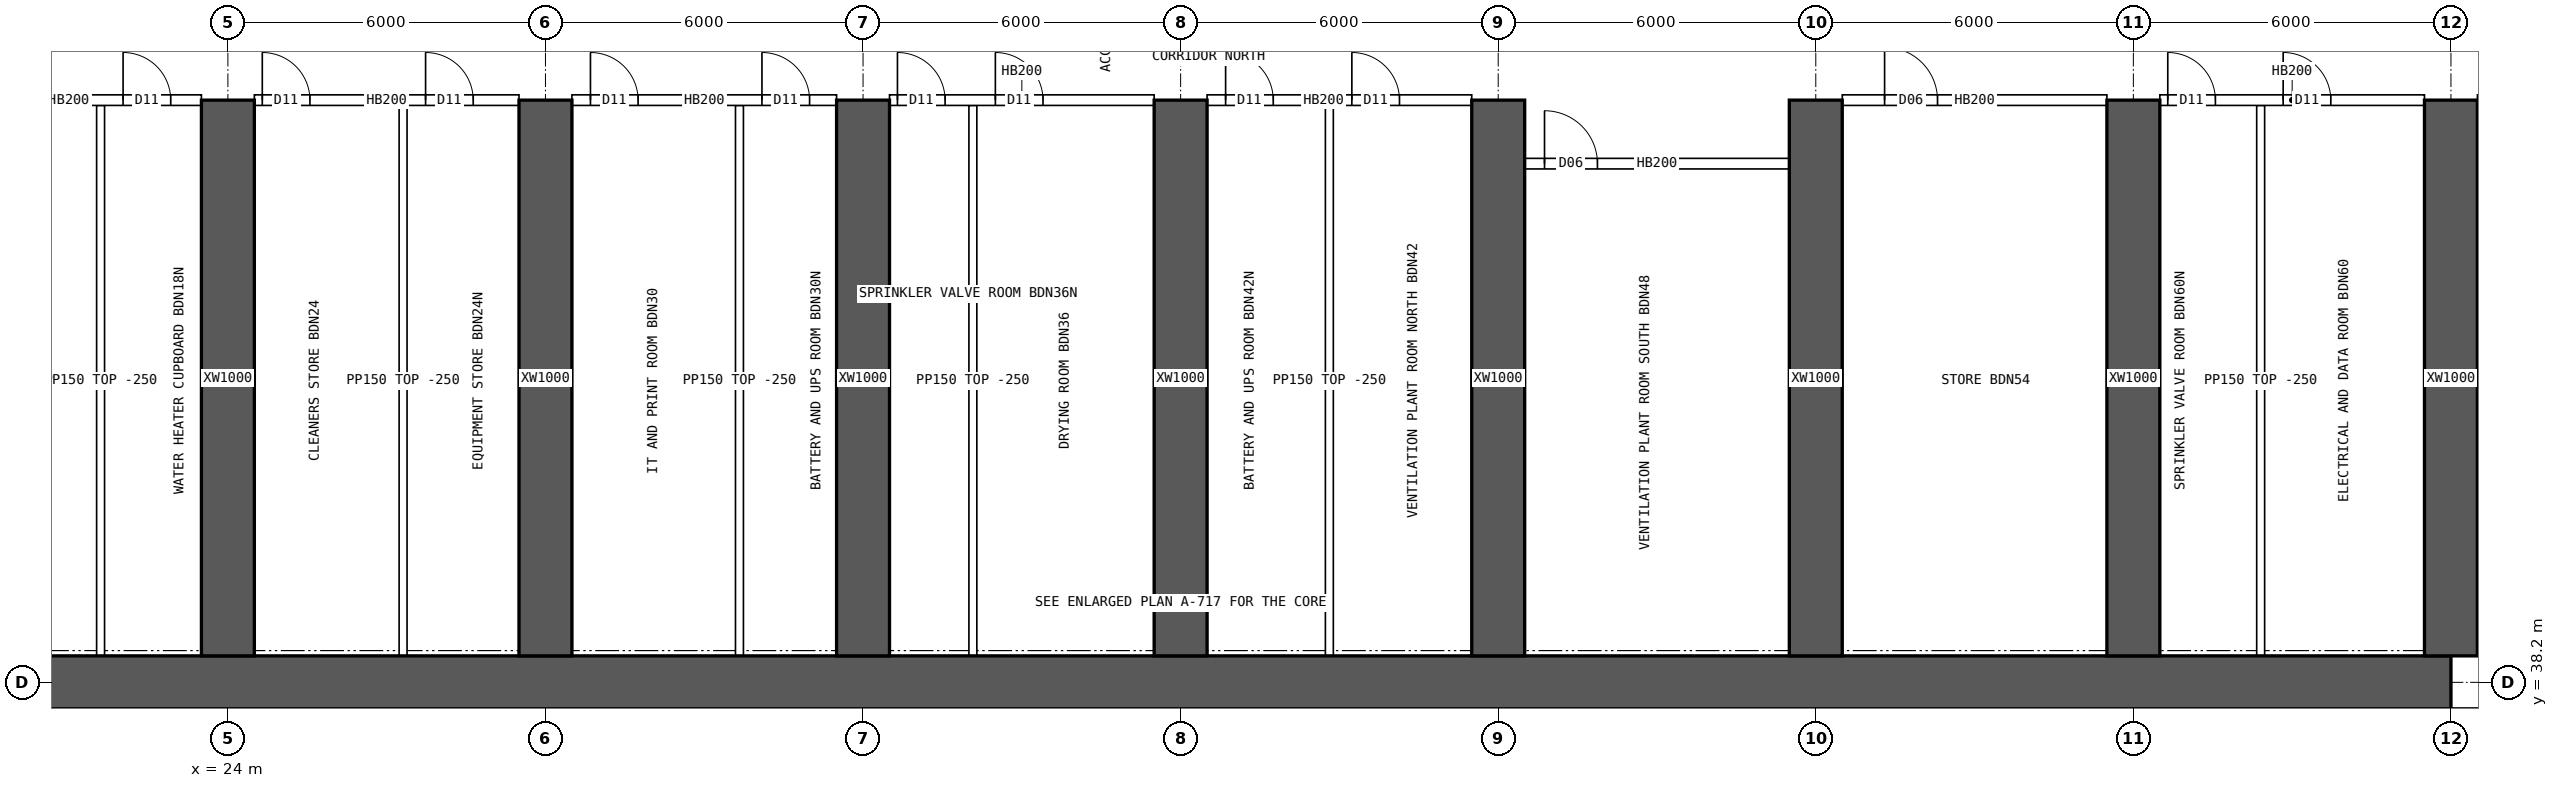
"""IFC4 building model, lengths in metres.
Left out: names, types, materials, properties, quantities, classifications, styles, units other than length and angle.
Written with IfcOpenShell. Run it as: python <this file> out.ifc"""

import sys

from ifc_helpers import new_model, si_unit, direction, frame, frame_2d, origin, place, context, subcontext, project, spatial, rectangle, extrude, element, fill, save


model = new_model("IFC4")
c1 = context("Model", 3, precision=1e-05, world=origin(), true_north=direction((0.0, 1.0)))
c2 = subcontext(c1, "Body", "Model", "MODEL_VIEW")
j1 = project(units=[si_unit("LENGTHUNIT", "METRE"), si_unit("PLANEANGLEUNIT", "RADIAN")], contexts=[c1])
p1 = place(None, origin())
s1 = spatial("IfcSite", under=j1, at=p1, CompositionType="ELEMENT")
p2 = place(p1, origin())
s2 = spatial("IfcBuilding", under=s1, at=p2, CompositionType="ELEMENT")
p3 = place(p2, frame((0.0, 0.0, 57.7)))
s3 = spatial("IfcBuildingStorey", under=s2, at=p3, CompositionType="ELEMENT", Elevation=57.7)
p4 = place(p3, frame((18.0, 38.2, 0.0), z_axis=(0.0, 0.0, 1.0), x_axis=(1.0, 0.0, 0.0)))
e1 = element("IfcWall", 1, at=p4, inside=s3, PredefinedType="SHEAR", context=c2, shape_type="SweptSolid", body=[
    extrude(rectangle(XDim=48.0, YDim=1.0, at=frame_2d((24.0, 0.0))), origin(), (0.0, 0.0, 1.0), 3.75),
])
for number, where, z_axis, x_axis in (
    (2, (21.6, 34.75, 0.0), (0.0, 0.0, 1.0), (0.0, 1.0, 0.0)),
    (3, (62.4, 34.75, 0.0), (0.0, 0.0, 1.0), (0.0, 1.0, 0.0)),
    (4, (26.0, 34.75, 0.0), (0.0, 0.0, 1.0), (0.0, 1.0, 0.0)),
    (5, (58.0, 34.75, 0.0), (0.0, 0.0, 1.0), (0.0, 1.0, 0.0)),
):
    element("IfcWall", number, at=place(p3, frame(where, z_axis=z_axis, x_axis=x_axis)), inside=s3, PredefinedType="SHEAR", context=c2, shape_type="SweptSolid", body=[
        extrude(rectangle(XDim=2.95, YDim=0.3, at=frame_2d((1.475, 0.0))), origin(), (0.0, 0.0, 1.0), 3.75),
    ])
for number, where, z_axis, x_axis in (
    (6, (24.0, 38.7, 0.0), (0.0, 0.0, 1.0), (0.0, 1.0, 0.0)),
    (7, (30.0, 38.7, 0.0), (0.0, 0.0, 1.0), (0.0, 1.0, 0.0)),
    (8, (36.0, 38.7, 0.0), (0.0, 0.0, 1.0), (0.0, 1.0, 0.0)),
    (9, (42.0, 38.7, 0.0), (0.0, 0.0, 1.0), (0.0, 1.0, 0.0)),
    (10, (48.0, 38.7, 0.0), (0.0, 0.0, 1.0), (0.0, 1.0, 0.0)),
    (11, (54.0, 38.7, 0.0), (0.0, 0.0, 1.0), (0.0, 1.0, 0.0)),
    (12, (60.0, 38.7, 0.0), (0.0, 0.0, 1.0), (0.0, 1.0, 0.0)),
    (13, (66.0, 38.7, 0.0), (0.0, 0.0, 1.0), (0.0, 1.0, 0.0)),
):
    element("IfcWall", number, at=place(p3, frame(where, z_axis=z_axis, x_axis=x_axis)), inside=s3, PredefinedType="SHEAR", context=c2, shape_type="SweptSolid", body=[
        extrude(rectangle(XDim=10.5, YDim=1.0, at=frame_2d((5.25, 0.0))), origin(), (0.0, 0.0, 1.0), 3.75),
    ])
for number, where, z_axis, x_axis in (
    (14, (29.651, 34.75, 0.0), (0.0, 0.0, 1.0), (0.0, 1.0, 0.0)),
    (15, (33.946, 34.75, 0.0), (0.0, 0.0, 1.0), (0.0, 1.0, 0.0)),
    (16, (36.946, 34.75, 0.0), (0.0, 0.0, 1.0), (0.0, 1.0, 0.0)),
    (17, (41.463, 34.75, 0.0), (0.0, 0.0, 1.0), (0.0, 1.0, 0.0)),
    (18, (45.758, 34.75, 0.0), (0.0, 0.0, 1.0), (0.0, 1.0, 0.0)),
    (19, (47.058, 34.75, 0.0), (0.0, 0.0, 1.0), (0.0, 1.0, 0.0)),
    (20, (50.503, 34.75, 0.0), (0.0, 0.0, 1.0), (0.0, 1.0, 0.0)),
):
    element("IfcWall", number, at=place(p3, frame(where, z_axis=z_axis, x_axis=x_axis)), inside=s3, PredefinedType="SOLIDWALL", context=c2, shape_type="SweptSolid", body=[
        extrude(rectangle(XDim=2.95, YDim=0.15, at=frame_2d((1.475, 0.0))), origin(), (0.0, 0.0, 1.0), 3.5),
    ])
p5 = place(p3, frame((18.5, 49.2, 0.0), z_axis=(0.0, 0.0, 1.0), x_axis=(1.0, 0.0, 0.0)))
e21 = element("IfcWall", 21, at=p5, inside=s3, PredefinedType="SOLIDWALL", context=c2, shape_type="SweptSolid", body=[
    extrude(rectangle(XDim=5.0, YDim=0.2, at=frame_2d((2.5, 0.0))), origin(), (0.0, 0.0, 1.0), 3.5),
])
p6 = place(p5, frame((0.35, 0.0, 0.0)))
e22 = element("IfcOpeningElement", 22, at=p6, cuts=e21, PredefinedType="OPENING", context=c2, shape_type="SweptSolid", body=[
    extrude(rectangle(XDim=0.9, YDim=2.1, at=frame_2d((0.45, 1.05))), frame((0.0, 0.11, 0.0), z_axis=(0.0, -1.0, 0.0), x_axis=(1.0, 0.0, 0.0)), (0.0, 0.0, 1.0), 0.22),
])
p7 = place(p5, frame((3.52, 0.0, 0.0)))
e23 = element("IfcOpeningElement", 23, at=p7, cuts=e21, PredefinedType="OPENING", context=c2, shape_type="SweptSolid", body=[
    extrude(rectangle(XDim=0.9, YDim=2.1, at=frame_2d((0.45, 1.05))), frame((0.0, 0.11, 0.0), z_axis=(0.0, -1.0, 0.0), x_axis=(1.0, 0.0, 0.0)), (0.0, 0.0, 1.0), 0.22),
])
p8 = place(p3, frame((24.5, 49.2, 0.0), z_axis=(0.0, 0.0, 1.0), x_axis=(1.0, 0.0, 0.0)))
e24 = element("IfcWall", 24, at=p8, inside=s3, PredefinedType="SOLIDWALL", context=c2, shape_type="SweptSolid", body=[
    extrude(rectangle(XDim=5.0, YDim=0.2, at=frame_2d((2.5, 0.0))), origin(), (0.0, 0.0, 1.0), 3.5),
])
p9 = place(p8, frame((0.15, 0.0, 0.0)))
e25 = element("IfcOpeningElement", 25, at=p9, cuts=e24, PredefinedType="OPENING", context=c2, shape_type="SweptSolid", body=[
    extrude(rectangle(XDim=0.9, YDim=2.1, at=frame_2d((0.45, 1.05))), frame((0.0, 0.11, 0.0), z_axis=(0.0, -1.0, 0.0), x_axis=(1.0, 0.0, 0.0)), (0.0, 0.0, 1.0), 0.22),
])
p10 = place(p8, frame((3.235, 0.0, 0.0)))
e26 = element("IfcOpeningElement", 26, at=p10, cuts=e24, PredefinedType="OPENING", context=c2, shape_type="SweptSolid", body=[
    extrude(rectangle(XDim=0.9, YDim=2.1, at=frame_2d((0.45, 1.05))), frame((0.0, 0.11, 0.0), z_axis=(0.0, -1.0, 0.0), x_axis=(1.0, 0.0, 0.0)), (0.0, 0.0, 1.0), 0.22),
])
p11 = place(p3, frame((30.5, 49.2, 0.0), z_axis=(0.0, 0.0, 1.0), x_axis=(1.0, 0.0, 0.0)))
e27 = element("IfcWall", 27, at=p11, inside=s3, PredefinedType="SOLIDWALL", context=c2, shape_type="SweptSolid", body=[
    extrude(rectangle(XDim=5.0, YDim=0.2, at=frame_2d((2.5, 0.0))), origin(), (0.0, 0.0, 1.0), 3.5),
])
p12 = place(p11, frame((0.35, 0.0, 0.0)))
e28 = element("IfcOpeningElement", 28, at=p12, cuts=e27, PredefinedType="OPENING", context=c2, shape_type="SweptSolid", body=[
    extrude(rectangle(XDim=0.9, YDim=2.1, at=frame_2d((0.45, 1.05))), frame((0.0, 0.11, 0.0), z_axis=(0.0, -1.0, 0.0), x_axis=(1.0, 0.0, 0.0)), (0.0, 0.0, 1.0), 0.22),
])
p13 = place(p11, frame((3.59, 0.0, 0.0)))
e29 = element("IfcOpeningElement", 29, at=p13, cuts=e27, PredefinedType="OPENING", context=c2, shape_type="SweptSolid", body=[
    extrude(rectangle(XDim=0.9, YDim=2.1, at=frame_2d((0.45, 1.05))), frame((0.0, 0.11, 0.0), z_axis=(0.0, -1.0, 0.0), x_axis=(1.0, 0.0, 0.0)), (0.0, 0.0, 1.0), 0.22),
])
p14 = place(p3, frame((36.5, 49.2, 0.0), z_axis=(0.0, 0.0, 1.0), x_axis=(1.0, 0.0, 0.0)))
e30 = element("IfcWall", 30, at=p14, inside=s3, PredefinedType="SOLIDWALL", context=c2, shape_type="SweptSolid", body=[
    extrude(rectangle(XDim=5.0, YDim=0.2, at=frame_2d((2.5, 0.0))), origin(), (0.0, 0.0, 1.0), 3.5),
])
p15 = place(p14, frame((0.15, 0.0, 0.0)))
e31 = element("IfcOpeningElement", 31, at=p15, cuts=e30, PredefinedType="OPENING", context=c2, shape_type="SweptSolid", body=[
    extrude(rectangle(XDim=0.9, YDim=2.1, at=frame_2d((0.45, 1.05))), frame((0.0, 0.11, 0.0), z_axis=(0.0, -1.0, 0.0), x_axis=(1.0, 0.0, 0.0)), (0.0, 0.0, 1.0), 0.22),
])
p16 = place(p14, frame((2.0, 0.0, 0.0)))
e32 = element("IfcOpeningElement", 32, at=p16, cuts=e30, PredefinedType="OPENING", context=c2, shape_type="SweptSolid", body=[
    extrude(rectangle(XDim=0.9, YDim=2.1, at=frame_2d((0.45, 1.05))), frame((0.0, 0.11, 0.0), z_axis=(0.0, -1.0, 0.0), x_axis=(1.0, 0.0, 0.0)), (0.0, 0.0, 1.0), 0.22),
])
p17 = place(p3, frame((42.5, 49.2, 0.0), z_axis=(0.0, 0.0, 1.0), x_axis=(1.0, 0.0, 0.0)))
e33 = element("IfcWall", 33, at=p17, inside=s3, PredefinedType="SOLIDWALL", context=c2, shape_type="SweptSolid", body=[
    extrude(rectangle(XDim=5.0, YDim=0.2, at=frame_2d((2.5, 0.0))), origin(), (0.0, 0.0, 1.0), 3.5),
])
p18 = place(p17, frame((0.35, 0.0, 0.0)))
e34 = element("IfcOpeningElement", 34, at=p18, cuts=e33, PredefinedType="OPENING", context=c2, shape_type="SweptSolid", body=[
    extrude(rectangle(XDim=0.9, YDim=2.1, at=frame_2d((0.45, 1.05))), frame((0.0, 0.11, 0.0), z_axis=(0.0, -1.0, 0.0), x_axis=(1.0, 0.0, 0.0)), (0.0, 0.0, 1.0), 0.22),
])
p19 = place(p17, frame((2.735, 0.0, 0.0)))
e35 = element("IfcOpeningElement", 35, at=p19, cuts=e33, PredefinedType="OPENING", context=c2, shape_type="SweptSolid", body=[
    extrude(rectangle(XDim=0.9, YDim=2.1, at=frame_2d((0.45, 1.05))), frame((0.0, 0.11, 0.0), z_axis=(0.0, -1.0, 0.0), x_axis=(1.0, 0.0, 0.0)), (0.0, 0.0, 1.0), 0.22),
])
p20 = place(p3, frame((54.5, 49.2, 0.0), z_axis=(0.0, 0.0, 1.0), x_axis=(1.0, 0.0, 0.0)))
e36 = element("IfcWall", 36, at=p20, inside=s3, PredefinedType="SOLIDWALL", context=c2, shape_type="SweptSolid", body=[
    extrude(rectangle(XDim=5.0, YDim=0.2, at=frame_2d((2.5, 0.0))), origin(), (0.0, 0.0, 1.0), 3.5),
])
p21 = place(p20, frame((0.8, 0.0, 0.0)))
e37 = element("IfcOpeningElement", 37, at=p21, cuts=e36, PredefinedType="OPENING", context=c2, shape_type="SweptSolid", body=[
    extrude(rectangle(XDim=1.0, YDim=2.1, at=frame_2d((0.5, 1.05))), frame((0.0, 0.11, 0.0), z_axis=(0.0, -1.0, 0.0), x_axis=(1.0, 0.0, 0.0)), (0.0, 0.0, 1.0), 0.22),
])
p22 = place(p3, frame((60.5, 49.2, 0.0), z_axis=(0.0, 0.0, 1.0), x_axis=(1.0, 0.0, 0.0)))
e38 = element("IfcWall", 38, at=p22, inside=s3, PredefinedType="SOLIDWALL", context=c2, shape_type="SweptSolid", body=[
    extrude(rectangle(XDim=5.0, YDim=0.2, at=frame_2d((2.5, 0.0))), origin(), (0.0, 0.0, 1.0), 3.5),
])
p23 = place(p22, frame((0.15, 0.0, 0.0)))
e39 = element("IfcOpeningElement", 39, at=p23, cuts=e38, PredefinedType="OPENING", context=c2, shape_type="SweptSolid", body=[
    extrude(rectangle(XDim=0.9, YDim=2.1, at=frame_2d((0.45, 1.05))), frame((0.0, 0.11, 0.0), z_axis=(0.0, -1.0, 0.0), x_axis=(1.0, 0.0, 0.0)), (0.0, 0.0, 1.0), 0.22),
])
p24 = place(p22, frame((2.33, 0.0, 0.0)))
e40 = element("IfcOpeningElement", 40, at=p24, cuts=e38, PredefinedType="OPENING", context=c2, shape_type="SweptSolid", body=[
    extrude(rectangle(XDim=0.9, YDim=2.1, at=frame_2d((0.45, 1.05))), frame((0.0, 0.11, 0.0), z_axis=(0.0, -1.0, 0.0), x_axis=(1.0, 0.0, 0.0)), (0.0, 0.0, 1.0), 0.22),
])
for number, where, z_axis, x_axis in (
    (41, (21.595, 38.7, 0.0), (0.0, 0.0, 1.0), (0.0, 1.0, 0.0)),
    (42, (27.31, 38.7, 0.0), (0.0, 0.0, 1.0), (0.0, 1.0, 0.0)),
    (43, (33.665, 38.7, 0.0), (0.0, 0.0, 1.0), (0.0, 1.0, 0.0)),
    (44, (38.075, 38.7, 0.0), (0.0, 0.0, 1.0), (0.0, 1.0, 0.0)),
    (45, (44.81, 38.7, 0.0), (0.0, 0.0, 1.0), (0.0, 1.0, 0.0)),
):
    element("IfcWall", number, at=place(p3, frame(where, z_axis=z_axis, x_axis=x_axis)), inside=s3, PredefinedType="PARTITIONING", context=c2, shape_type="SweptSolid", body=[
        extrude(rectangle(XDim=10.4, YDim=0.15, at=frame_2d((5.2, 0.0))), origin(), (0.0, 0.0, 1.0), 3.5),
    ])
p25 = place(p3, frame((48.5, 48.0, 0.0), z_axis=(0.0, 0.0, 1.0), x_axis=(1.0, 0.0, 0.0)))
e46 = element("IfcWall", 46, at=p25, inside=s3, PredefinedType="SOLIDWALL", context=c2, shape_type="SweptSolid", body=[
    extrude(rectangle(XDim=5.0, YDim=0.2, at=frame_2d((2.5, 0.0))), origin(), (0.0, 0.0, 1.0), 3.5),
])
p26 = place(p25, frame((0.375, 0.0, 0.0)))
e47 = element("IfcOpeningElement", 47, at=p26, cuts=e46, PredefinedType="OPENING", context=c2, shape_type="SweptSolid", body=[
    extrude(rectangle(XDim=1.0, YDim=2.1, at=frame_2d((0.5, 1.05))), frame((0.0, 0.11, 0.0), z_axis=(0.0, -1.0, 0.0), x_axis=(1.0, 0.0, 0.0)), (0.0, 0.0, 1.0), 0.22),
])
p27 = place(p3, frame((62.405, 38.7, 0.0), z_axis=(0.0, 0.0, 1.0), x_axis=(0.0, 1.0, 0.0)))
e48 = element("IfcWall", 48, at=p27, inside=s3, PredefinedType="PARTITIONING", context=c2, shape_type="SweptSolid", body=[
    extrude(rectangle(XDim=10.4, YDim=0.15, at=frame_2d((5.2, 0.0))), origin(), (0.0, 0.0, 1.0), 3.5),
])
p28 = place(p7, origin())
e49 = element("IfcDoor", 49, at=p28, inside=s3, OperationType="SINGLE_SWING_LEFT", PredefinedType="DOOR", context=c2, shape_type="SweptSolid", body=[
    extrude(rectangle(XDim=0.9, YDim=2.1, at=frame_2d((0.45, 1.05))), frame((0.0, 0.025, 0.0), z_axis=(0.0, -1.0, 0.0), x_axis=(1.0, 0.0, 0.0)), (0.0, 0.0, 1.0), 0.05),
])
fill(e23, e49)
p29 = place(p9, origin())
e50 = element("IfcDoor", 50, at=p29, inside=s3, OperationType="SINGLE_SWING_LEFT", PredefinedType="DOOR", context=c2, shape_type="SweptSolid", body=[
    extrude(rectangle(XDim=0.9, YDim=2.1, at=frame_2d((0.45, 1.05))), frame((0.0, 0.025, 0.0), z_axis=(0.0, -1.0, 0.0), x_axis=(1.0, 0.0, 0.0)), (0.0, 0.0, 1.0), 0.05),
])
fill(e25, e50)
p30 = place(p10, origin())
e51 = element("IfcDoor", 51, at=p30, inside=s3, OperationType="SINGLE_SWING_LEFT", PredefinedType="DOOR", context=c2, shape_type="SweptSolid", body=[
    extrude(rectangle(XDim=0.9, YDim=2.1, at=frame_2d((0.45, 1.05))), frame((0.0, 0.025, 0.0), z_axis=(0.0, -1.0, 0.0), x_axis=(1.0, 0.0, 0.0)), (0.0, 0.0, 1.0), 0.05),
])
fill(e26, e51)
p31 = place(p12, origin())
e52 = element("IfcDoor", 52, at=p31, inside=s3, OperationType="SINGLE_SWING_LEFT", PredefinedType="DOOR", context=c2, shape_type="SweptSolid", body=[
    extrude(rectangle(XDim=0.9, YDim=2.1, at=frame_2d((0.45, 1.05))), frame((0.0, 0.025, 0.0), z_axis=(0.0, -1.0, 0.0), x_axis=(1.0, 0.0, 0.0)), (0.0, 0.0, 1.0), 0.05),
])
fill(e28, e52)
p32 = place(p13, origin())
e53 = element("IfcDoor", 53, at=p32, inside=s3, OperationType="SINGLE_SWING_LEFT", PredefinedType="DOOR", context=c2, shape_type="SweptSolid", body=[
    extrude(rectangle(XDim=0.9, YDim=2.1, at=frame_2d((0.45, 1.05))), frame((0.0, 0.025, 0.0), z_axis=(0.0, -1.0, 0.0), x_axis=(1.0, 0.0, 0.0)), (0.0, 0.0, 1.0), 0.05),
])
fill(e29, e53)
p33 = place(p15, origin())
e54 = element("IfcDoor", 54, at=p33, inside=s3, OperationType="SINGLE_SWING_LEFT", PredefinedType="DOOR", context=c2, shape_type="SweptSolid", body=[
    extrude(rectangle(XDim=0.9, YDim=2.1, at=frame_2d((0.45, 1.05))), frame((0.0, 0.025, 0.0), z_axis=(0.0, -1.0, 0.0), x_axis=(1.0, 0.0, 0.0)), (0.0, 0.0, 1.0), 0.05),
])
fill(e31, e54)
p34 = place(p16, origin())
e55 = element("IfcDoor", 55, at=p34, inside=s3, OperationType="SINGLE_SWING_LEFT", PredefinedType="DOOR", context=c2, shape_type="SweptSolid", body=[
    extrude(rectangle(XDim=0.9, YDim=2.1, at=frame_2d((0.45, 1.05))), frame((0.0, 0.025, 0.0), z_axis=(0.0, -1.0, 0.0), x_axis=(1.0, 0.0, 0.0)), (0.0, 0.0, 1.0), 0.05),
])
fill(e32, e55)
p35 = place(p18, origin())
e56 = element("IfcDoor", 56, at=p35, inside=s3, OperationType="SINGLE_SWING_LEFT", PredefinedType="DOOR", context=c2, shape_type="SweptSolid", body=[
    extrude(rectangle(XDim=0.9, YDim=2.1, at=frame_2d((0.45, 1.05))), frame((0.0, 0.025, 0.0), z_axis=(0.0, -1.0, 0.0), x_axis=(1.0, 0.0, 0.0)), (0.0, 0.0, 1.0), 0.05),
])
fill(e34, e56)
p36 = place(p19, origin())
e57 = element("IfcDoor", 57, at=p36, inside=s3, OperationType="SINGLE_SWING_LEFT", PredefinedType="DOOR", context=c2, shape_type="SweptSolid", body=[
    extrude(rectangle(XDim=0.9, YDim=2.1, at=frame_2d((0.45, 1.05))), frame((0.0, 0.025, 0.0), z_axis=(0.0, -1.0, 0.0), x_axis=(1.0, 0.0, 0.0)), (0.0, 0.0, 1.0), 0.05),
])
fill(e35, e57)
p37 = place(p26, origin())
e58 = element("IfcDoor", 58, at=p37, inside=s3, OperationType="SINGLE_SWING_LEFT", PredefinedType="DOOR", context=c2, shape_type="SweptSolid", body=[
    extrude(rectangle(XDim=1.0, YDim=2.1, at=frame_2d((0.5, 1.05))), frame((0.0, 0.025, 0.0), z_axis=(0.0, -1.0, 0.0), x_axis=(1.0, 0.0, 0.0)), (0.0, 0.0, 1.0), 0.05),
])
fill(e47, e58)
p38 = place(p21, origin())
e59 = element("IfcDoor", 59, at=p38, inside=s3, OperationType="SINGLE_SWING_LEFT", PredefinedType="DOOR", context=c2, shape_type="SweptSolid", body=[
    extrude(rectangle(XDim=1.0, YDim=2.1, at=frame_2d((0.5, 1.05))), frame((0.0, 0.025, 0.0), z_axis=(0.0, -1.0, 0.0), x_axis=(1.0, 0.0, 0.0)), (0.0, 0.0, 1.0), 0.05),
])
fill(e37, e59)
p39 = place(p23, origin())
e60 = element("IfcDoor", 60, at=p39, inside=s3, OperationType="SINGLE_SWING_LEFT", PredefinedType="DOOR", context=c2, shape_type="SweptSolid", body=[
    extrude(rectangle(XDim=0.9, YDim=2.1, at=frame_2d((0.45, 1.05))), frame((0.0, 0.025, 0.0), z_axis=(0.0, -1.0, 0.0), x_axis=(1.0, 0.0, 0.0)), (0.0, 0.0, 1.0), 0.05),
])
fill(e39, e60)
p40 = place(p24, origin())
e61 = element("IfcDoor", 61, at=p40, inside=s3, OperationType="SINGLE_SWING_LEFT", PredefinedType="DOOR", context=c2, shape_type="SweptSolid", body=[
    extrude(rectangle(XDim=0.9, YDim=2.1, at=frame_2d((0.45, 1.05))), frame((0.0, 0.025, 0.0), z_axis=(0.0, -1.0, 0.0), x_axis=(1.0, 0.0, 0.0)), (0.0, 0.0, 1.0), 0.05),
])
fill(e40, e61)
save(model, sys.argv[1])
